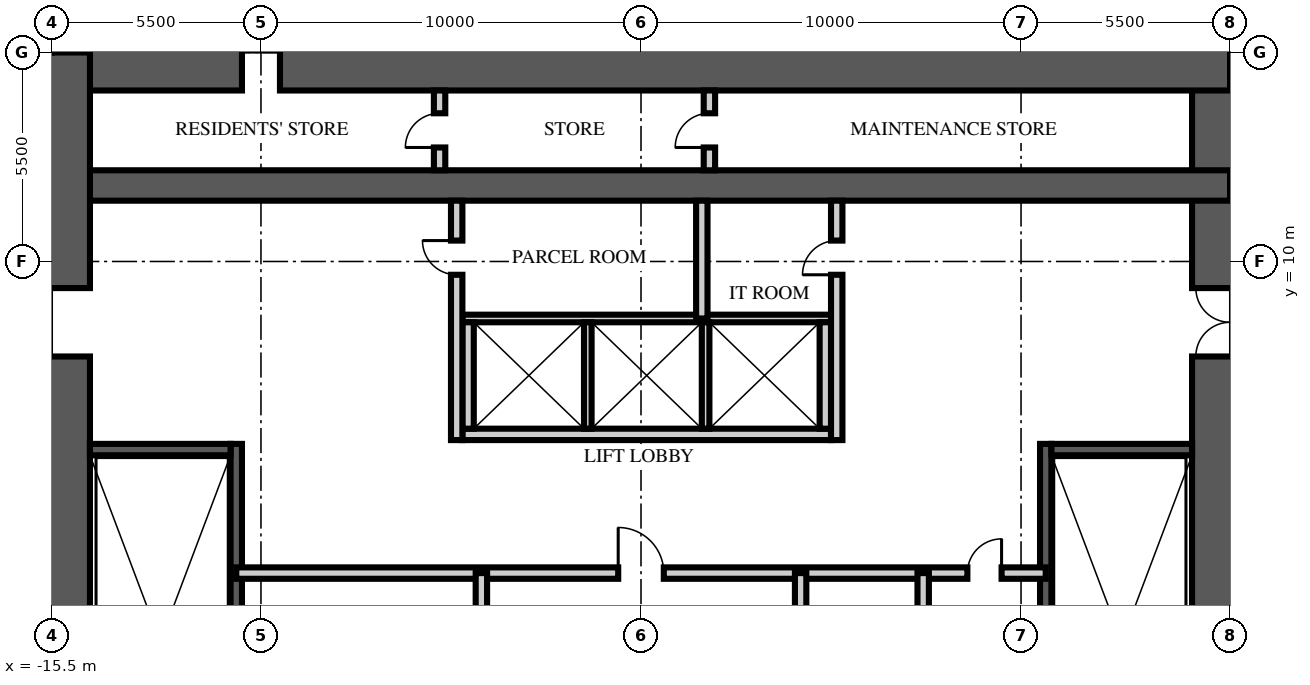
"""IFC4 building model, lengths in metres.
Left out: names, types, materials, properties, quantities, classifications, styles, units other than length and angle.
Written with IfcOpenShell. Run it as: python <this file> out.ifc"""

import sys

from ifc_helpers import new_model, si_unit, direction, frame, frame_2d, origin, place, context, subcontext, project, spatial, rectangle, extrude, element, fill, save


model = new_model("IFC4")
c1 = context("Model", 3, precision=1e-05, world=origin(), true_north=direction((0.0, 1.0)))
c2 = subcontext(c1, "Body", "Model", "MODEL_VIEW")
j1 = project(units=[si_unit("LENGTHUNIT", "METRE"), si_unit("PLANEANGLEUNIT", "RADIAN")], contexts=[c1])
p1 = place(None, origin())
s1 = spatial("IfcSite", under=j1, at=p1, CompositionType="ELEMENT")
p2 = place(p1, origin())
s2 = spatial("IfcBuilding", under=s1, at=p2, CompositionType="ELEMENT")
p3 = place(p2, frame((0.0, 0.0, 111.0)))
s3 = spatial("IfcBuildingStorey", under=s2, at=p3, CompositionType="ELEMENT", Elevation=111.0)
p4 = place(p3, frame((15.5, -15.5, -0.25), z_axis=(0.0, 0.0, 1.0), x_axis=(0.0, 1.0, 0.0)))
e1 = element("IfcWall", 1, at=p4, inside=s3, PredefinedType="SHEAR", context=c2, shape_type="SweptSolid", body=[
    extrude(rectangle(XDim=31.0, YDim=2.0, at=frame_2d((15.5, 0.0))), origin(), (0.0, 0.0, 1.0), 3.75),
])
p5 = place(p4, frame((6.5, 0.0, 0.25)))
e2 = element("IfcOpeningElement", 2, at=p5, cuts=e1, PredefinedType="OPENING", context=c2, shape_type="SweptSolid", body=[
    extrude(rectangle(XDim=1.2, YDim=2.1, at=frame_2d((0.6, 1.05))), frame((0.0, 1.01, 0.0), z_axis=(0.0, -1.0, 0.0), x_axis=(1.0, 0.0, 0.0)), (0.0, 0.0, 1.0), 2.02),
])
p6 = place(p4, frame((23.0, 0.0, 0.25)))
e3 = element("IfcOpeningElement", 3, at=p6, cuts=e1, PredefinedType="OPENING", context=c2, shape_type="SweptSolid", body=[
    extrude(rectangle(XDim=1.8, YDim=2.1, at=frame_2d((0.9, 1.05))), frame((0.0, 1.01, 0.0), z_axis=(0.0, -1.0, 0.0), x_axis=(1.0, 0.0, 0.0)), (0.0, 0.0, 1.0), 2.02),
])
p7 = place(p3, frame((-15.5, 15.5, -0.25), z_axis=(0.0, 0.0, 1.0), x_axis=(1.0, 0.0, 0.0)))
e4 = element("IfcWall", 4, at=p7, inside=s3, PredefinedType="SHEAR", context=c2, shape_type="SweptSolid", body=[
    extrude(rectangle(XDim=31.0, YDim=2.0, at=frame_2d((15.5, 0.0))), origin(), (0.0, 0.0, 1.0), 3.75),
])
p8 = place(p7, frame((5.0, 0.0, 0.25)))
e5 = element("IfcOpeningElement", 5, at=p8, cuts=e4, PredefinedType="OPENING", context=c2, shape_type="SweptSolid", body=[
    extrude(rectangle(XDim=1.0, YDim=2.1, at=frame_2d((0.5, 1.05))), frame((0.0, 1.01, 0.0), z_axis=(0.0, -1.0, 0.0), x_axis=(1.0, 0.0, 0.0)), (0.0, 0.0, 1.0), 2.02),
])
p9 = place(p3, frame((-15.5, 12.0, -0.25), z_axis=(0.0, 0.0, 1.0), x_axis=(1.0, 0.0, 0.0)))
e6 = element("IfcWall", 6, at=p9, inside=s3, PredefinedType="SHEAR", context=c2, shape_type="SweptSolid", body=[
    extrude(rectangle(XDim=31.0, YDim=0.8, at=frame_2d((15.5, 0.0))), origin(), (0.0, 0.0, 1.0), 3.75),
])
p10 = place(p3, frame((-15.5, -15.5, -0.25), z_axis=(0.0, 0.0, 1.0), x_axis=(0.0, 1.0, 0.0)))
e7 = element("IfcWall", 7, at=p10, inside=s3, PredefinedType="SHEAR", context=c2, shape_type="SweptSolid", body=[
    extrude(rectangle(XDim=31.0, YDim=2.0, at=frame_2d((15.5, 0.0))), origin(), (0.0, 0.0, 1.0), 3.75),
])
p11 = place(p10, frame((6.5, 0.0, 0.25)))
e8 = element("IfcOpeningElement", 8, at=p11, cuts=e7, PredefinedType="OPENING", context=c2, shape_type="SweptSolid", body=[
    extrude(rectangle(XDim=1.2, YDim=2.1, at=frame_2d((0.6, 1.05))), frame((0.0, 1.01, 0.0), z_axis=(0.0, -1.0, 0.0), x_axis=(1.0, 0.0, 0.0)), (0.0, 0.0, 1.0), 2.02),
])
p12 = place(p10, frame((23.0, 0.0, 0.25)))
e9 = element("IfcOpeningElement", 9, at=p12, cuts=e7, PredefinedType="OPENING", context=c2, shape_type="SweptSolid", body=[
    extrude(rectangle(XDim=1.8, YDim=2.1, at=frame_2d((0.9, 1.05))), frame((0.0, 1.01, 0.0), z_axis=(0.0, -1.0, 0.0), x_axis=(1.0, 0.0, 0.0)), (0.0, 0.0, 1.0), 2.02),
])
p13 = place(p3, frame((-10.65, -4.9, 0.0), z_axis=(0.0, 0.0, 1.0), x_axis=(0.0, 1.0, 0.0)))
e10 = element("IfcWall", 10, at=p13, inside=s3, PredefinedType="SOLIDWALL", context=c2, shape_type="SweptSolid", body=[
    extrude(rectangle(XDim=10.1, YDim=0.3, at=frame_2d((5.05, 0.0))), origin(), (0.0, 0.0, 1.0), 3.5),
])
p14 = place(p3, frame((-14.5, 5.05, 0.0), z_axis=(0.0, 0.0, 1.0), x_axis=(1.0, 0.0, 0.0)))
e11 = element("IfcWall", 11, at=p14, inside=s3, PredefinedType="SOLIDWALL", context=c2, shape_type="SweptSolid", body=[
    extrude(rectangle(XDim=3.7, YDim=0.3, at=frame_2d((1.85, 0.0))), origin(), (0.0, 0.0, 1.0), 3.5),
])
p15 = place(p3, frame((10.65, -4.9, 0.0), z_axis=(0.0, 0.0, 1.0), x_axis=(0.0, 1.0, 0.0)))
e12 = element("IfcWall", 12, at=p15, inside=s3, PredefinedType="SOLIDWALL", context=c2, shape_type="SweptSolid", body=[
    extrude(rectangle(XDim=10.1, YDim=0.3, at=frame_2d((5.05, 0.0))), origin(), (0.0, 0.0, 1.0), 3.5),
])
p16 = place(p3, frame((14.5, 5.05, 0.0), z_axis=(0.0, 0.0, 1.0), x_axis=(-1.0, 0.0, 0.0)))
e13 = element("IfcWall", 13, at=p16, inside=s3, PredefinedType="SOLIDWALL", context=c2, shape_type="SweptSolid", body=[
    extrude(rectangle(XDim=3.7, YDim=0.3, at=frame_2d((1.85, 0.0))), origin(), (0.0, 0.0, 1.0), 3.5),
])
p17 = place(p3, frame((-4.7, 5.45, 0.0), z_axis=(0.0, 0.0, 1.0), x_axis=(1.0, 0.0, 0.0)))
e14 = element("IfcWall", 14, at=p17, inside=s3, PredefinedType="PARTITIONING", context=c2, shape_type="SweptSolid", body=[
    extrude(rectangle(XDim=9.7, YDim=0.3, at=frame_2d((4.85, 0.0))), origin(), (0.0, 0.0, 1.0), 3.5),
])
p18 = place(p3, frame((-4.7, 8.5, 0.0), z_axis=(0.0, 0.0, 1.0), x_axis=(1.0, 0.0, 0.0)))
e15 = element("IfcWall", 15, at=p18, inside=s3, PredefinedType="PARTITIONING", context=c2, shape_type="SweptSolid", body=[
    extrude(rectangle(XDim=9.7, YDim=0.2, at=frame_2d((4.85, 0.0))), origin(), (0.0, 0.0, 1.0), 3.5),
])
for number, where, z_axis, x_axis in (
    (16, (-4.55, 5.6, 0.0), (0.0, 0.0, 1.0), (0.0, 1.0, 0.0)),
    (17, (4.85, 5.6, 0.0), (0.0, 0.0, 1.0), (0.0, 1.0, 0.0)),
):
    element("IfcWall", number, at=place(p3, frame(where, z_axis=z_axis, x_axis=x_axis)), inside=s3, PredefinedType="PARTITIONING", context=c2, shape_type="SweptSolid", body=[
        extrude(rectangle(XDim=2.8, YDim=0.3, at=frame_2d((1.4, 0.0))), origin(), (0.0, 0.0, 1.0), 3.5),
    ])
for number, where, z_axis, x_axis in (
    (18, (-1.4, 5.6, 0.0), (0.0, 0.0, 1.0), (0.0, 1.0, 0.0)),
    (19, (1.7, 5.6, 0.0), (0.0, 0.0, 1.0), (0.0, 1.0, 0.0)),
):
    element("IfcWall", number, at=place(p3, frame(where, z_axis=z_axis, x_axis=x_axis)), inside=s3, PredefinedType="PARTITIONING", context=c2, shape_type="SweptSolid", body=[
        extrude(rectangle(XDim=2.8, YDim=0.2, at=frame_2d((1.4, 0.0))), origin(), (0.0, 0.0, 1.0), 3.5),
    ])
p19 = place(p3, frame((-10.65, 1.8, 0.0), z_axis=(0.0, 0.0, 1.0), x_axis=(1.0, 0.0, 0.0)))
e20 = element("IfcWall", 20, at=p19, inside=s3, PredefinedType="PARTITIONING", context=c2, shape_type="SweptSolid", body=[
    extrude(rectangle(XDim=21.3, YDim=0.3, at=frame_2d((10.65, 0.0))), origin(), (0.0, 0.0, 1.0), 3.5),
])
p20 = place(p19, frame((10.05, 0.0, 0.0)))
e21 = element("IfcOpeningElement", 21, at=p20, cuts=e20, PredefinedType="OPENING", context=c2, shape_type="SweptSolid", body=[
    extrude(rectangle(XDim=1.2, YDim=2.1, at=frame_2d((0.6, 1.05))), frame((0.0, 0.16, 0.0), z_axis=(0.0, -1.0, 0.0), x_axis=(1.0, 0.0, 0.0)), (0.0, 0.0, 1.0), 0.32),
])
p21 = place(p19, frame((19.238, 0.0, 0.0)))
e22 = element("IfcOpeningElement", 22, at=p21, cuts=e20, PredefinedType="OPENING", context=c2, shape_type="SweptSolid", body=[
    extrude(rectangle(XDim=0.9, YDim=2.1, at=frame_2d((0.45, 1.05))), frame((0.0, 0.16, 0.0), z_axis=(0.0, -1.0, 0.0), x_axis=(1.0, 0.0, 0.0)), (0.0, 0.0, 1.0), 0.32),
])
p22 = place(p3, frame((-4.2, -6.65, 0.0), z_axis=(0.0, 0.0, 1.0), x_axis=(0.0, 1.0, 0.0)))
e23 = element("IfcWall", 23, at=p22, inside=s3, PredefinedType="PARTITIONING", context=c2, shape_type="SweptSolid", body=[
    extrude(rectangle(XDim=8.45, YDim=0.3, at=frame_2d((4.225, 0.0))), origin(), (0.0, 0.0, 1.0), 3.5),
])
p23 = place(p22, frame((1.285, 0.0, 0.0)))
e24 = element("IfcOpeningElement", 24, at=p23, cuts=e23, PredefinedType="OPENING", context=c2, shape_type="SweptSolid", body=[
    extrude(rectangle(XDim=0.9, YDim=2.1, at=frame_2d((0.45, 1.05))), frame((0.0, 0.16, 0.0), z_axis=(0.0, -1.0, 0.0), x_axis=(1.0, 0.0, 0.0)), (0.0, 0.0, 1.0), 0.32),
])
p24 = place(p22, frame((5.51, 0.0, 0.0)))
e25 = element("IfcOpeningElement", 25, at=p24, cuts=e23, PredefinedType="OPENING", context=c2, shape_type="SweptSolid", body=[
    extrude(rectangle(XDim=0.9, YDim=2.1, at=frame_2d((0.45, 1.05))), frame((0.0, 0.16, 0.0), z_axis=(0.0, -1.0, 0.0), x_axis=(1.0, 0.0, 0.0)), (0.0, 0.0, 1.0), 0.32),
])
p25 = place(p3, frame((4.2, -6.65, 0.0), z_axis=(0.0, 0.0, 1.0), x_axis=(0.0, 1.0, 0.0)))
e26 = element("IfcWall", 26, at=p25, inside=s3, PredefinedType="PARTITIONING", context=c2, shape_type="SweptSolid", body=[
    extrude(rectangle(XDim=8.45, YDim=0.3, at=frame_2d((4.225, 0.0))), origin(), (0.0, 0.0, 1.0), 3.5),
])
p26 = place(p25, frame((1.451, 0.0, 0.0)))
e27 = element("IfcOpeningElement", 27, at=p26, cuts=e26, PredefinedType="OPENING", context=c2, shape_type="SweptSolid", body=[
    extrude(rectangle(XDim=0.9, YDim=2.1, at=frame_2d((0.45, 1.05))), frame((0.0, 0.16, 0.0), z_axis=(0.0, -1.0, 0.0), x_axis=(1.0, 0.0, 0.0)), (0.0, 0.0, 1.0), 0.32),
])
p27 = place(p25, frame((5.676, 0.0, 0.0)))
e28 = element("IfcOpeningElement", 28, at=p27, cuts=e26, PredefinedType="OPENING", context=c2, shape_type="SweptSolid", body=[
    extrude(rectangle(XDim=0.9, YDim=2.1, at=frame_2d((0.45, 1.05))), frame((0.0, 0.16, 0.0), z_axis=(0.0, -1.0, 0.0), x_axis=(1.0, 0.0, 0.0)), (0.0, 0.0, 1.0), 0.32),
])
p28 = place(p3, frame((7.425, -2.848, 0.0), z_axis=(0.0, 0.0, 1.0), x_axis=(0.0, 1.0, 0.0)))
e29 = element("IfcWall", 29, at=p28, inside=s3, PredefinedType="PARTITIONING", context=c2, shape_type="SweptSolid", body=[
    extrude(rectangle(XDim=4.648, YDim=0.3, at=frame_2d((2.324, 0.0))), origin(), (0.0, 0.0, 1.0), 3.5),
])
p29 = place(p3, frame((-4.85, 5.3, 0.0), z_axis=(0.0, 0.0, 1.0), x_axis=(0.0, 1.0, 0.0)))
e30 = element("IfcWall", 30, at=p29, inside=s3, PredefinedType="PARTITIONING", context=c2, shape_type="SweptSolid", body=[
    extrude(rectangle(XDim=6.3, YDim=0.3, at=frame_2d((3.15, 0.0))), origin(), (0.0, 0.0, 1.0), 3.5),
])
p30 = place(p29, frame((4.35, 0.0, 0.0)))
e31 = element("IfcOpeningElement", 31, at=p30, cuts=e30, PredefinedType="OPENING", context=c2, shape_type="SweptSolid", body=[
    extrude(rectangle(XDim=0.9, YDim=2.1, at=frame_2d((0.45, 1.05))), frame((0.0, 0.16, 0.0), z_axis=(0.0, -1.0, 0.0), x_axis=(1.0, 0.0, 0.0)), (0.0, 0.0, 1.0), 0.32),
])
p31 = place(p3, frame((5.15, 5.3, 0.0), z_axis=(0.0, 0.0, 1.0), x_axis=(0.0, 1.0, 0.0)))
e32 = element("IfcWall", 32, at=p31, inside=s3, PredefinedType="PARTITIONING", context=c2, shape_type="SweptSolid", body=[
    extrude(rectangle(XDim=6.3, YDim=0.3, at=frame_2d((3.15, 0.0))), origin(), (0.0, 0.0, 1.0), 3.5),
])
p32 = place(p31, frame((4.35, 0.0, 0.0)))
e33 = element("IfcOpeningElement", 33, at=p32, cuts=e32, PredefinedType="OPENING", context=c2, shape_type="SweptSolid", body=[
    extrude(rectangle(XDim=0.9, YDim=2.1, at=frame_2d((0.45, 1.05))), frame((0.0, 0.16, 0.0), z_axis=(0.0, -1.0, 0.0), x_axis=(1.0, 0.0, 0.0)), (0.0, 0.0, 1.0), 0.32),
])
p33 = place(p3, frame((1.6, 8.5, 0.0), z_axis=(0.0, 0.0, 1.0), x_axis=(0.0, 1.0, 0.0)))
e34 = element("IfcWall", 34, at=p33, inside=s3, PredefinedType="PARTITIONING", context=c2, shape_type="SweptSolid", body=[
    extrude(rectangle(XDim=3.1, YDim=0.3, at=frame_2d((1.55, 0.0))), origin(), (0.0, 0.0, 1.0), 3.5),
])
p34 = place(p3, frame((-5.3, 12.4, 0.0), z_axis=(0.0, 0.0, 1.0), x_axis=(0.0, 1.0, 0.0)))
e35 = element("IfcWall", 35, at=p34, inside=s3, PredefinedType="PARTITIONING", context=c2, shape_type="SweptSolid", body=[
    extrude(rectangle(XDim=2.1, YDim=0.3, at=frame_2d((1.05, 0.0))), origin(), (0.0, 0.0, 1.0), 3.5),
])
p35 = place(p34, frame((0.6, 0.0, 0.0)))
e36 = element("IfcOpeningElement", 36, at=p35, cuts=e35, PredefinedType="OPENING", context=c2, shape_type="SweptSolid", body=[
    extrude(rectangle(XDim=0.9, YDim=2.1, at=frame_2d((0.45, 1.05))), frame((0.0, 0.16, 0.0), z_axis=(0.0, -1.0, 0.0), x_axis=(1.0, 0.0, 0.0)), (0.0, 0.0, 1.0), 0.32),
])
p36 = place(p3, frame((1.8, 12.4, 0.0), z_axis=(0.0, 0.0, 1.0), x_axis=(0.0, 1.0, 0.0)))
e37 = element("IfcWall", 37, at=p36, inside=s3, PredefinedType="PARTITIONING", context=c2, shape_type="SweptSolid", body=[
    extrude(rectangle(XDim=2.1, YDim=0.3, at=frame_2d((1.05, 0.0))), origin(), (0.0, 0.0, 1.0), 3.5),
])
p37 = place(p36, frame((0.6, 0.0, 0.0)))
e38 = element("IfcOpeningElement", 38, at=p37, cuts=e37, PredefinedType="OPENING", context=c2, shape_type="SweptSolid", body=[
    extrude(rectangle(XDim=0.9, YDim=2.1, at=frame_2d((0.45, 1.05))), frame((0.0, 0.16, 0.0), z_axis=(0.0, -1.0, 0.0), x_axis=(1.0, 0.0, 0.0)), (0.0, 0.0, 1.0), 0.32),
])
p38 = place(p12, origin())
e39 = element("IfcDoor", 39, at=p38, inside=s3, OperationType="DOUBLE_DOOR_SINGLE_SWING", PredefinedType="DOOR", context=c2, shape_type="SweptSolid", body=[
    extrude(rectangle(XDim=1.8, YDim=2.1, at=frame_2d((0.9, 1.05))), frame((0.0, 0.025, 0.0), z_axis=(0.0, -1.0, 0.0), x_axis=(1.0, 0.0, 0.0)), (0.0, 0.0, 1.0), 0.05),
])
fill(e9, e39)
p39 = place(p6, origin())
e40 = element("IfcDoor", 40, at=p39, inside=s3, OperationType="DOUBLE_DOOR_SINGLE_SWING", PredefinedType="DOOR", context=c2, shape_type="SweptSolid", body=[
    extrude(rectangle(XDim=1.8, YDim=2.1, at=frame_2d((0.9, 1.05))), frame((0.0, 0.025, 0.0), z_axis=(0.0, -1.0, 0.0), x_axis=(1.0, 0.0, 0.0)), (0.0, 0.0, 1.0), 0.05),
])
fill(e3, e40)
p40 = place(p20, origin())
e41 = element("IfcDoor", 41, at=p40, inside=s3, OperationType="SINGLE_SWING_LEFT", PredefinedType="DOOR", context=c2, shape_type="SweptSolid", body=[
    extrude(rectangle(XDim=1.2, YDim=2.1, at=frame_2d((0.6, 1.05))), frame((0.0, 0.025, 0.0), z_axis=(0.0, -1.0, 0.0), x_axis=(1.0, 0.0, 0.0)), (0.0, 0.0, 1.0), 0.05),
])
fill(e21, e41)
p41 = place(p21, origin())
e42 = element("IfcDoor", 42, at=p41, inside=s3, OperationType="SINGLE_SWING_RIGHT", PredefinedType="DOOR", context=c2, shape_type="SweptSolid", body=[
    extrude(rectangle(XDim=0.9, YDim=2.1, at=frame_2d((0.45, 1.05))), frame((0.0, 0.025, 0.0), z_axis=(0.0, -1.0, 0.0), x_axis=(1.0, 0.0, 0.0)), (0.0, 0.0, 1.0), 0.05),
])
fill(e22, e42)
p42 = place(p30, origin())
e43 = element("IfcDoor", 43, at=p42, inside=s3, OperationType="SINGLE_SWING_RIGHT", PredefinedType="DOOR", context=c2, shape_type="SweptSolid", body=[
    extrude(rectangle(XDim=0.9, YDim=2.1, at=frame_2d((0.45, 1.05))), frame((0.0, 0.025, 0.0), z_axis=(0.0, -1.0, 0.0), x_axis=(1.0, 0.0, 0.0)), (0.0, 0.0, 1.0), 0.05),
])
fill(e31, e43)
p43 = place(p32, origin())
e44 = element("IfcDoor", 44, at=p43, inside=s3, OperationType="SINGLE_SWING_LEFT", PredefinedType="DOOR", context=c2, shape_type="SweptSolid", body=[
    extrude(rectangle(XDim=0.9, YDim=2.1, at=frame_2d((0.45, 1.05))), frame((0.0, 0.025, 0.0), z_axis=(0.0, -1.0, 0.0), x_axis=(1.0, 0.0, 0.0)), (0.0, 0.0, 1.0), 0.05),
])
fill(e33, e44)
p44 = place(p35, origin())
e45 = element("IfcDoor", 45, at=p44, inside=s3, OperationType="SINGLE_SWING_LEFT", PredefinedType="DOOR", context=c2, shape_type="SweptSolid", body=[
    extrude(rectangle(XDim=0.9, YDim=2.1, at=frame_2d((0.45, 1.05))), frame((0.0, 0.025, 0.0), z_axis=(0.0, -1.0, 0.0), x_axis=(1.0, 0.0, 0.0)), (0.0, 0.0, 1.0), 0.05),
])
fill(e36, e45)
p45 = place(p37, origin())
e46 = element("IfcDoor", 46, at=p45, inside=s3, OperationType="SINGLE_SWING_LEFT", PredefinedType="DOOR", context=c2, shape_type="SweptSolid", body=[
    extrude(rectangle(XDim=0.9, YDim=2.1, at=frame_2d((0.45, 1.05))), frame((0.0, 0.025, 0.0), z_axis=(0.0, -1.0, 0.0), x_axis=(1.0, 0.0, 0.0)), (0.0, 0.0, 1.0), 0.05),
])
fill(e38, e46)
p46 = place(p8, origin())
e47 = element("IfcDoor", 47, at=p46, inside=s3, OperationType="SINGLE_SWING_RIGHT", PredefinedType="DOOR", context=c2, shape_type="SweptSolid", body=[
    extrude(rectangle(XDim=1.0, YDim=2.1, at=frame_2d((0.5, 1.05))), frame((0.0, 0.025, 0.0), z_axis=(0.0, -1.0, 0.0), x_axis=(1.0, 0.0, 0.0)), (0.0, 0.0, 1.0), 0.05),
])
fill(e5, e47)
save(model, sys.argv[1])
